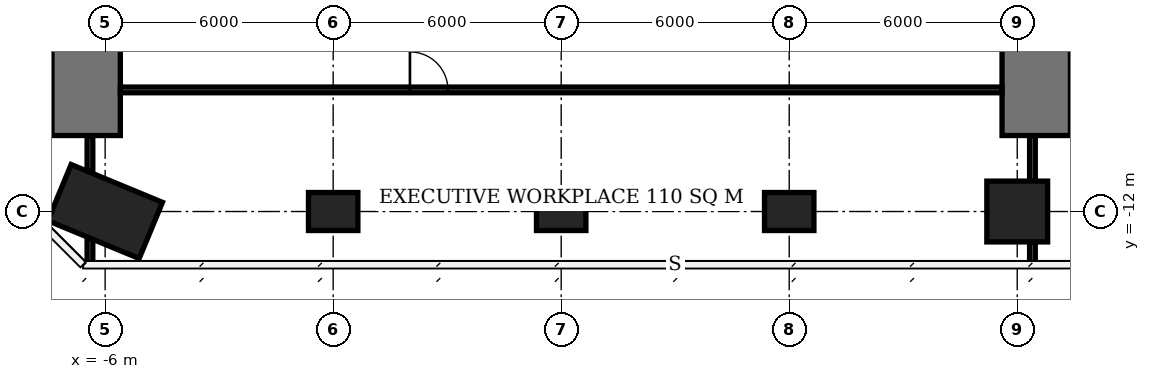
"""IFC4 building model, lengths in metres.
Left out: names, types, materials, properties, quantities, classifications, styles, units other than length and angle.
Written with IfcOpenShell. Run it as: python <this file> out.ifc"""

import sys

from ifc_helpers import new_model, si_unit, direction, frame, frame_2d, origin, origin_2d, place, context, subcontext, project, spatial, rectangle, extrude, element, fill, save


model = new_model("IFC4")
c1 = context("Model", 3, precision=1e-05, world=origin(), true_north=direction((0.0, 1.0)))
c2 = subcontext(c1, "Body", "Model", "MODEL_VIEW")
j1 = project(units=[si_unit("LENGTHUNIT", "METRE"), si_unit("PLANEANGLEUNIT", "RADIAN")], contexts=[c1])
p1 = place(None, origin())
s1 = spatial("IfcSite", under=j1, at=p1, CompositionType="ELEMENT")
p2 = place(p1, origin())
s2 = spatial("IfcBuilding", under=s1, at=p2, CompositionType="ELEMENT")
p3 = place(p2, frame((0.0, 0.0, 260.6)))
s3 = spatial("IfcBuildingStorey", under=s2, at=p3, CompositionType="ELEMENT", Elevation=260.6)
p4 = place(p3, frame((-6.0, -12.0, 0.0), z_axis=(0.0, 0.0, 1.0), x_axis=(-0.923879532511, 0.382683432365, 0.0)))
e1 = element("IfcColumn", 1, at=p4, inside=s3, PredefinedType="COLUMN", context=c2, shape_type="SweptSolid", body=[
    extrude(rectangle(XDim=2.6, YDim=1.6, at=origin_2d()), origin(), (0.0, 0.0, 1.0), 3.9),
])
for number, where, z_axis, x_axis in (
    (2, (0.0, -12.0, 0.0), (0.0, 0.0, 1.0), (1.0, 0.0, 0.0)),
    (3, (6.0, -12.0, 0.0), (0.0, 0.0, 1.0), (1.0, 0.0, 0.0)),
    (4, (12.0, -12.0, 0.0), (0.0, 0.0, 1.0), (1.0, 0.0, 0.0)),
):
    element("IfcColumn", number, at=place(p3, frame(where, z_axis=z_axis, x_axis=x_axis)), inside=s3, PredefinedType="COLUMN", context=c2, shape_type="SweptSolid", body=[
        extrude(rectangle(XDim=1.3, YDim=1.0, at=origin_2d()), origin(), (0.0, 0.0, 1.0), 3.9),
    ])
p5 = place(p3, frame((18.0, -12.0, 0.0), z_axis=(0.0, 0.0, 1.0), x_axis=(1.0, 0.0, 0.0)))
e5 = element("IfcColumn", 5, at=p5, inside=s3, PredefinedType="COLUMN", context=c2, shape_type="SweptSolid", body=[
    extrude(rectangle(XDim=1.6, YDim=1.6, at=origin_2d()), origin(), (0.0, 0.0, 1.0), 3.9),
])
for number, where, z_axis, x_axis in (
    (6, (-6.5, -10.0, 0.0), (0.0, 0.0, 1.0), (0.0, 1.0, 0.0)),
    (7, (18.5, -10.0, 0.0), (0.0, 0.0, 1.0), (0.0, 1.0, 0.0)),
):
    element("IfcWall", number, at=place(p3, frame(where, z_axis=z_axis, x_axis=x_axis)), inside=s3, PredefinedType="SHEAR", context=c2, shape_type="SweptSolid", body=[
        extrude(rectangle(XDim=2.4, YDim=1.8, at=frame_2d((1.2, 0.0))), origin(), (0.0, 0.0, 1.0), 3.9),
    ])
p6 = place(p3, frame((-6.4, -13.375, 0.0), z_axis=(0.0, 0.0, 1.0), x_axis=(0.0, 1.0, 0.0)))
e8 = element("IfcWall", 8, at=p6, inside=s3, PredefinedType="PARTITIONING", context=c2, shape_type="SweptSolid", body=[
    extrude(rectangle(XDim=0.644, YDim=0.15, at=frame_2d((0.322, 0.0))), origin(), (0.0, 0.0, 1.0), 3.65),
])
p7 = place(p3, frame((-6.4, -10.937, 0.0), z_axis=(0.0, 0.0, 1.0), x_axis=(0.0, 1.0, 0.0)))
e9 = element("IfcWall", 9, at=p7, inside=s3, PredefinedType="PARTITIONING", context=c2, shape_type="SweptSolid", body=[
    extrude(rectangle(XDim=0.937, YDim=0.15, at=frame_2d((0.469, 0.0))), origin(), (0.0, 0.0, 1.0), 3.65),
])
p8 = place(p3, frame((-5.6, -8.8, 0.0), z_axis=(0.0, 0.0, 1.0), x_axis=(1.0, 0.0, 0.0)))
e10 = element("IfcWall", 10, at=p8, inside=s3, PredefinedType="PARTITIONING", context=c2, shape_type="SweptSolid", body=[
    extrude(rectangle(XDim=23.2, YDim=0.15, at=frame_2d((11.6, 0.0))), origin(), (0.0, 0.0, 1.0), 3.65),
])
p9 = place(p8, frame((7.62, 0.0, 0.0)))
e11 = element("IfcOpeningElement", 11, at=p9, cuts=e10, PredefinedType="OPENING", context=c2, shape_type="SweptSolid", body=[
    extrude(rectangle(XDim=1.0, YDim=2.4, at=frame_2d((0.5, 1.2))), frame((0.0, 0.085, 0.0), z_axis=(0.0, -1.0, 0.0), x_axis=(1.0, 0.0, 0.0)), (0.0, 0.0, 1.0), 0.17),
])
p10 = place(p3, frame((18.4, -13.35, 0.0), z_axis=(0.0, 0.0, 1.0), x_axis=(0.0, 1.0, 0.0)))
e12 = element("IfcWall", 12, at=p10, inside=s3, PredefinedType="PARTITIONING", context=c2, shape_type="SweptSolid", body=[
    extrude(rectangle(XDim=0.55, YDim=0.15, at=frame_2d((0.275, 0.0))), origin(), (0.0, 0.0, 1.0), 3.65),
])
p11 = place(p3, frame((18.4, -11.2, 0.0), z_axis=(0.0, 0.0, 1.0), x_axis=(0.0, 1.0, 0.0)))
e13 = element("IfcWall", 13, at=p11, inside=s3, PredefinedType="PARTITIONING", context=c2, shape_type="SweptSolid", body=[
    extrude(rectangle(XDim=1.2, YDim=0.15, at=frame_2d((0.6, 0.0))), origin(), (0.0, 0.0, 1.0), 3.65),
])
p12 = place(p9, origin())
e14 = element("IfcDoor", 14, at=p12, inside=s3, OperationType="SINGLE_SWING_LEFT", PredefinedType="DOOR", context=c2, shape_type="SweptSolid", body=[
    extrude(rectangle(XDim=1.0, YDim=2.4, at=frame_2d((0.5, 1.2))), frame((0.0, 0.025, 0.0), z_axis=(0.0, -1.0, 0.0), x_axis=(1.0, 0.0, 0.0)), (0.0, 0.0, 1.0), 0.05),
])
fill(e11, e14)
save(model, sys.argv[1])
